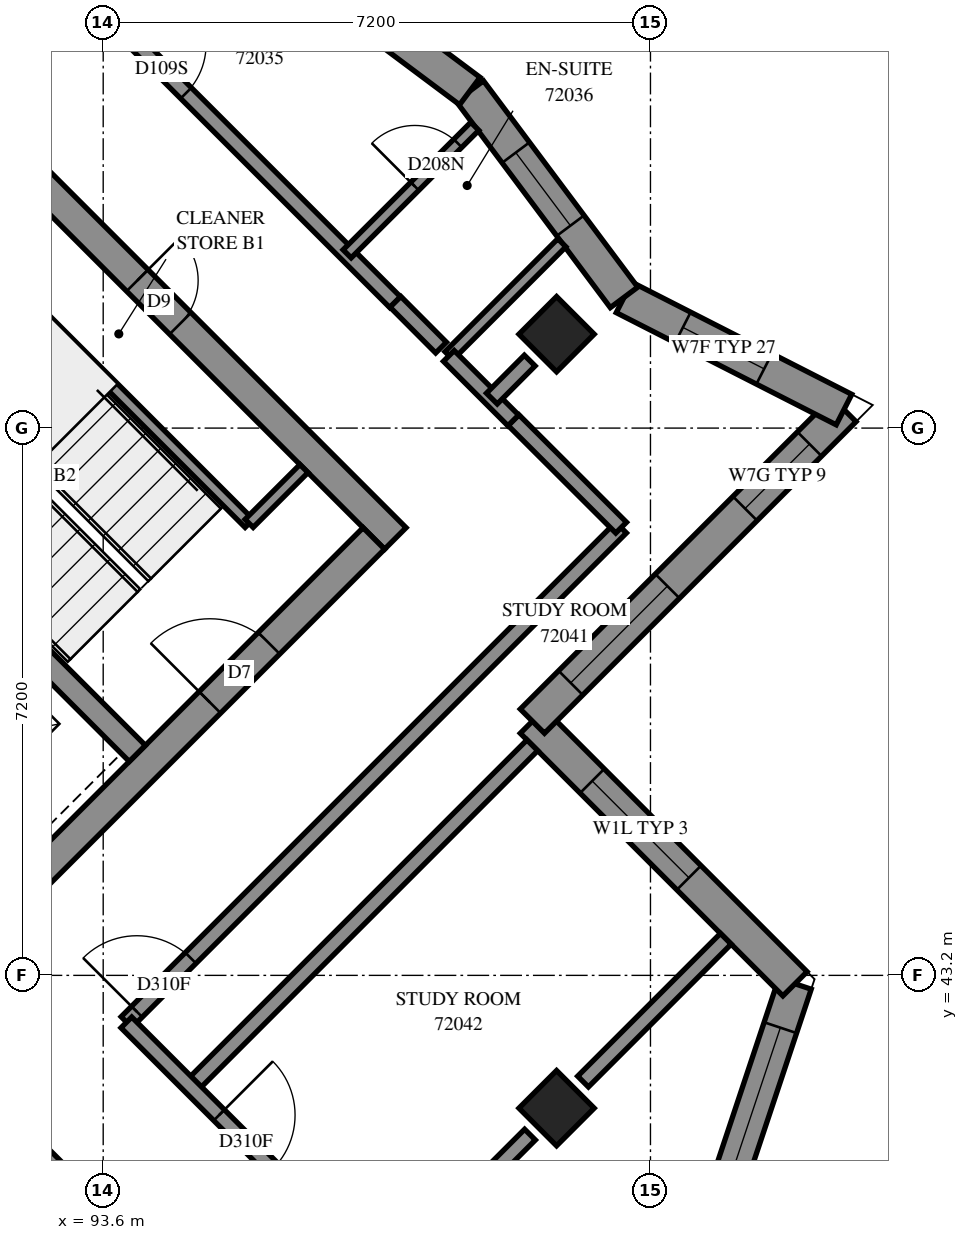
"""IFC4 building model, lengths in metres.
Left out: names, types, materials, properties, quantities, classifications, styles, units other than length and angle.
Written with IfcOpenShell. Run it as: python <this file> out.ifc"""

import sys

from ifc_helpers import new_model, si_unit, direction, frame, frame_2d, origin, origin_2d, place, context, subcontext, project, spatial, polyline, rectangle, outline, extrude, element, fill, save


model = new_model("IFC4")
c1 = context("Model", 3, precision=1e-05, world=origin(), true_north=direction((0.0, 1.0)))
c2 = subcontext(c1, "Body", "Model", "MODEL_VIEW")
j1 = project(units=[si_unit("LENGTHUNIT", "METRE"), si_unit("PLANEANGLEUNIT", "RADIAN")], contexts=[c1])
p1 = place(None, origin())
s1 = spatial("IfcSite", under=j1, at=p1, CompositionType="ELEMENT")
p2 = place(p1, origin())
s2 = spatial("IfcBuilding", under=s1, at=p2, CompositionType="ELEMENT")
p3 = place(p2, frame((0.0, 0.0, 264.2)))
s3 = spatial("IfcBuildingStorey", under=s2, at=p3, CompositionType="ELEMENT", Elevation=264.2)
for number, where, z_axis, x_axis in (
    (1, (99.565, 51.635, 0.0), (0.0, 0.0, 1.0), (0.707, -0.707, 0.0)),
    (2, (99.565, 41.453, 0.0), (0.0, 0.0, 1.0), (0.707, -0.707, 0.0)),
):
    element("IfcColumn", number, at=place(p3, frame(where, z_axis=z_axis, x_axis=x_axis)), inside=s3, PredefinedType="COLUMN", context=c2, shape_type="SweptSolid", body=[
        extrude(rectangle(XDim=0.7, YDim=0.7, at=origin_2d()), origin(), (0.0, 0.0, 1.0), 3.1),
    ])
p4 = place(p3, frame((86.695, 59.696, -0.3), z_axis=(0.0, 0.0, 1.0), x_axis=(0.7071100706, -0.7071034917, 0.0)))
e3 = element("IfcWall", 3, at=p4, inside=s3, PredefinedType="SHEAR", context=c2, shape_type="SweptSolid", body=[
    extrude(rectangle(XDim=15.2, YDim=0.4, at=frame_2d((7.6, 0.0))), origin(), (0.0, 0.0, 1.0), 2.7),
])
p5 = place(p4, frame((10.4, 0.0, 0.3)))
e4 = element("IfcOpeningElement", 4, at=p5, cuts=e3, PredefinedType="OPENING", context=c2, shape_type="SweptSolid", body=[
    extrude(rectangle(XDim=0.8, YDim=2.1, at=frame_2d((0.4, 1.05))), frame((0.0, 0.21, 0.0), z_axis=(0.0, -1.0, 0.0), x_axis=(1.0, 0.0, 0.0)), (0.0, 0.0, 1.0), 0.42),
])
p6 = place(p3, frame((86.978, 38.766, -0.3), z_axis=(0.0, 0.0, 1.0), x_axis=(0.7071067812, 0.7071067812, 0.0)))
e5 = element("IfcWall", 5, at=p6, inside=s3, PredefinedType="SHEAR", context=c2, shape_type="SweptSolid", body=[
    extrude(rectangle(XDim=14.4, YDim=0.4, at=frame_2d((7.2, 0.0))), origin(), (0.0, 0.0, 1.0), 2.7),
])
p7 = place(p6, frame((4.55, 0.0, 0.3)))
e6 = element("IfcOpeningElement", 6, at=p7, cuts=e5, PredefinedType="OPENING", context=c2, shape_type="SweptSolid", body=[
    extrude(rectangle(XDim=1.1, YDim=2.1, at=frame_2d((0.55, 1.05))), frame((0.0, 0.21, 0.0), z_axis=(0.0, -1.0, 0.0), x_axis=(1.0, 0.0, 0.0)), (0.0, 0.0, 1.0), 0.42),
])
p8 = place(p6, frame((11.35, 0.0, 0.3)))
e7 = element("IfcOpeningElement", 7, at=p8, cuts=e5, PredefinedType="OPENING", context=c2, shape_type="SweptSolid", body=[
    extrude(rectangle(XDim=1.1, YDim=2.1, at=frame_2d((0.55, 1.05))), frame((0.0, 0.21, 0.0), z_axis=(0.0, -1.0, 0.0), x_axis=(1.0, 0.0, 0.0)), (0.0, 0.0, 1.0), 0.42),
])
p9 = place(p3, frame((88.958, 51.211, 0.0), z_axis=(0.0, 0.0, 1.0), x_axis=(0.7070998367, -0.7071137256, 0.0)))
e8 = element("IfcWall", 8, at=p9, inside=s3, PredefinedType="SOLIDWALL", context=c2, shape_type="SweptSolid", body=[
    extrude(rectangle(XDim=7.2, YDim=0.3, at=frame_2d((3.6, 0.0))), origin(), (0.0, 0.0, 1.0), 3.1),
])
p10 = place(p3, frame((101.082, 38.232, 0.0), z_axis=(0.0, 0.0, 1.0), x_axis=(0.316227766, 0.9486832981, 0.0)))
e9 = element("IfcWall", 9, at=p10, inside=s3, PredefinedType="SOLIDWALL", context=c2, shape_type="SweptSolid", body=[
    extrude(outline(polyline([(-0.108, -0.225), (5.259, -0.225), (4.981, 0.225), (0.108, 0.225), (-0.108, -0.225)])), origin(), (0.0, 0.0, 1.0), 3.1),
])
p11 = place(p10, frame((1.711, 0.0, 0.45)))
e10 = element("IfcOpeningElement", 10, at=p11, cuts=e9, PredefinedType="OPENING", context=c2, shape_type="SweptSolid", body=[
    extrude(rectangle(XDim=2.8, YDim=2.55, at=frame_2d((1.4, 1.275))), frame((0.0, 0.235, 0.0), z_axis=(0.0, -1.0, 0.0), x_axis=(1.0, 0.0, 0.0)), (0.0, 0.0, 1.0), 0.47),
])
p12 = place(p3, frame((102.701, 43.089, 0.0), z_axis=(0.0, 0.0, 1.0), x_axis=(-0.7070965479, 0.7071170144, 0.0)))
e11 = element("IfcWall", 11, at=p12, inside=s3, PredefinedType="SOLIDWALL", context=c2, shape_type="SweptSolid", body=[
    extrude(outline(polyline([(-0.139, -0.225), (4.661, -0.225), (5.111, 0.225), (0.139, 0.225), (-0.139, -0.225)])), origin(), (0.0, 0.0, 1.0), 3.1),
])
p13 = place(p12, frame((1.974, 0.0, 0.6)))
e12 = element("IfcOpeningElement", 12, at=p13, cuts=e11, PredefinedType="OPENING", context=c2, shape_type="SweptSolid", body=[
    extrude(rectangle(XDim=1.8, YDim=1.9, at=frame_2d((0.9, 0.95))), frame((0.0, 0.235, 0.0), z_axis=(0.0, -1.0, 0.0), x_axis=(1.0, 0.0, 0.0)), (0.0, 0.0, 1.0), 0.47),
])
p14 = place(p3, frame((99.246, 46.544, 0.0), z_axis=(0.0, 0.0, 1.0), x_axis=(0.7071067812, 0.7071067812, 0.0)))
e13 = element("IfcWall", 13, at=p14, inside=s3, PredefinedType="SOLIDWALL", context=c2, shape_type="SweptSolid", body=[
    extrude(outline(polyline([(0.225, -0.225), (6.107, -0.225), (5.488, 0.225), (-0.225, 0.225), (0.225, -0.225)])), origin(), (0.0, 0.0, 1.0), 3.1),
])
p15 = place(p14, frame((0.713, 0.0, 0.6)))
e14 = element("IfcOpeningElement", 14, at=p15, cuts=e13, PredefinedType="OPENING", context=c2, shape_type="SweptSolid", body=[
    extrude(rectangle(XDim=1.8, YDim=1.9, at=frame_2d((0.9, 0.95))), frame((0.0, 0.235, 0.0), z_axis=(0.0, -1.0, 0.0), x_axis=(1.0, 0.0, 0.0)), (0.0, 0.0, 1.0), 0.47),
])
p16 = place(p14, frame((3.956, 0.0, 0.6)))
e15 = element("IfcOpeningElement", 15, at=p16, cuts=e13, PredefinedType="OPENING", context=c2, shape_type="SweptSolid", body=[
    extrude(rectangle(XDim=1.2, YDim=1.9, at=frame_2d((0.6, 0.95))), frame((0.0, 0.235, 0.0), z_axis=(0.0, -1.0, 0.0), x_axis=(1.0, 0.0, 0.0)), (0.0, 0.0, 1.0), 0.47),
])
p17 = place(p3, frame((103.346, 50.644, 0.0), z_axis=(0.0, 0.0, 1.0), x_axis=(-0.8908277316, 0.4543412292, 0.0)))
e16 = element("IfcWall", 16, at=p17, inside=s3, PredefinedType="SOLIDWALL", context=c2, shape_type="SweptSolid", body=[
    extrude(outline(polyline([(-0.31, -0.225), (3.196, -0.225), (3.301, 0.225), (0.31, 0.225), (-0.31, -0.225)])), origin(), (0.0, 0.0, 1.0), 3.1),
])
p18 = place(p17, frame((1.179, 0.0, 0.45)))
e17 = element("IfcOpeningElement", 17, at=p18, cuts=e16, PredefinedType="OPENING", context=c2, shape_type="SweptSolid", body=[
    extrude(rectangle(XDim=1.2, YDim=2.55, at=frame_2d((0.6, 1.275))), frame((0.0, 0.235, 0.0), z_axis=(0.0, -1.0, 0.0), x_axis=(1.0, 0.0, 0.0)), (0.0, 0.0, 1.0), 0.47),
])
p19 = place(p3, frame((100.452, 52.12, 0.0), z_axis=(0.0, 0.0, 1.0), x_axis=(-0.5986678127, 0.8009974095, 0.0)))
e18 = element("IfcWall", 18, at=p19, inside=s3, PredefinedType="SOLIDWALL", context=c2, shape_type="SweptSolid", body=[
    extrude(outline(polyline([(0.052, -0.225), (3.421, -0.225), (3.357, 0.225), (-0.052, 0.225), (0.052, -0.225)])), origin(), (0.0, 0.0, 1.0), 3.1),
])
p20 = place(p19, frame((1.178, 0.0, 0.45)))
e19 = element("IfcOpeningElement", 19, at=p20, cuts=e18, PredefinedType="OPENING", context=c2, shape_type="SweptSolid", body=[
    extrude(rectangle(XDim=1.2, YDim=2.55, at=frame_2d((0.6, 1.275))), frame((0.0, 0.235, 0.0), z_axis=(0.0, -1.0, 0.0), x_axis=(1.0, 0.0, 0.0)), (0.0, 0.0, 1.0), 0.47),
])
p21 = place(p3, frame((98.423, 54.834, 0.0), z_axis=(0.0, 0.0, 1.0), x_axis=(-0.8009997286, 0.5986647099, 0.0)))
e20 = element("IfcWall", 20, at=p21, inside=s3, PredefinedType="SOLIDWALL", context=c2, shape_type="SweptSolid", body=[
    extrude(outline(polyline([(-0.033, -0.225), (3.337, -0.225), (3.402, 0.225), (0.033, 0.225), (-0.033, -0.225)])), origin(), (0.0, 0.0, 1.0), 3.1),
])
p22 = place(p21, frame((1.253, 0.0, 0.45)))
e21 = element("IfcOpeningElement", 21, at=p22, cuts=e20, PredefinedType="OPENING", context=c2, shape_type="SweptSolid", body=[
    extrude(rectangle(XDim=1.2, YDim=2.55, at=frame_2d((0.6, 1.275))), frame((0.0, 0.235, 0.0), z_axis=(0.0, -1.0, 0.0), x_axis=(1.0, 0.0, 0.0)), (0.0, 0.0, 1.0), 0.47),
])
p23 = place(p3, frame((91.313, 53.354, 0.0), z_axis=(0.0, 0.0, 1.0), x_axis=(0.7071067812, -0.7071067812, 0.0)))
e22 = element("IfcWall", 22, at=p23, inside=s3, PredefinedType="PARTITIONING", context=c2, shape_type="SweptSolid", body=[
    extrude(rectangle(XDim=5.95, YDim=0.15, at=frame_2d((2.975, 0.0))), origin(), (0.0, 0.0, 1.0), 3.1),
])
p24 = place(p3, frame((95.52, 49.146, 0.0), z_axis=(0.0, 0.0, 1.0), x_axis=(0.7071067812, 0.7071067812, 0.0)))
e23 = element("IfcWall", 23, at=p24, inside=s3, PredefinedType="PARTITIONING", context=c2, shape_type="SweptSolid", body=[
    extrude(rectangle(XDim=1.02, YDim=0.15, at=frame_2d((0.51, 0.0))), origin(), (0.0, 0.0, 1.0), 3.1),
])
p25 = place(p3, frame((93.907, 42.585, 0.0), z_axis=(0.0, 0.0, 1.0), x_axis=(0.7071067812, 0.7071067812, 0.0)))
e24 = element("IfcWall", 24, at=p25, inside=s3, PredefinedType="PARTITIONING", context=c2, shape_type="SweptSolid", body=[
    extrude(rectangle(XDim=9.201, YDim=0.2, at=frame_2d((4.601, 0.0))), origin(), (0.0, 0.0, 1.0), 3.1),
])
p26 = place(p25, frame((0.193, 0.0, 0.0)))
e25 = element("IfcOpeningElement", 25, at=p26, cuts=e24, PredefinedType="OPENING", context=c2, shape_type="SweptSolid", body=[
    extrude(rectangle(XDim=1.0, YDim=2.1, at=frame_2d((0.5, 1.05))), frame((0.0, 0.11, 0.0), z_axis=(0.0, -1.0, 0.0), x_axis=(1.0, 0.0, 0.0)), (0.0, 0.0, 1.0), 0.22),
])
p27 = place(p3, frame((94.755, 41.737, 0.0), z_axis=(0.0, 0.0, 1.0), x_axis=(0.7071146549, 0.7070989073, 0.0)))
e26 = element("IfcWall", 26, at=p27, inside=s3, PredefinedType="PARTITIONING", context=c2, shape_type="SweptSolid", body=[
    extrude(rectangle(XDim=6.35, YDim=0.2, at=frame_2d((3.175, 0.0))), origin(), (0.0, 0.0, 1.0), 3.1),
])
p28 = place(p3, frame((93.621, 55.875, 0.0), z_axis=(0.0, 0.0, 1.0), x_axis=(0.7071623255, -0.7070512325, 0.0)))
e27 = element("IfcWall", 27, at=p28, inside=s3, PredefinedType="PARTITIONING", context=c2, shape_type="SweptSolid", body=[
    extrude(rectangle(XDim=5.401, YDim=0.2, at=frame_2d((2.7, 0.0))), origin(), (0.0, 0.0, 1.0), 3.1),
])
p29 = place(p28, frame((0.611, 0.0, 0.0)))
e28 = element("IfcOpeningElement", 28, at=p29, cuts=e27, PredefinedType="OPENING", context=c2, shape_type="SweptSolid", body=[
    extrude(rectangle(XDim=0.9, YDim=2.1, at=frame_2d((0.45, 1.05))), frame((0.0, 0.11, 0.0), z_axis=(0.0, -1.0, 0.0), x_axis=(1.0, 0.0, 0.0)), (0.0, 0.0, 1.0), 0.22),
])
p30 = place(p3, frame((93.905, 42.581, 0.0), z_axis=(0.0, 0.0, 1.0), x_axis=(0.7071067812, -0.7071067812, 0.0)))
e29 = element("IfcWall", 29, at=p30, inside=s3, PredefinedType="PARTITIONING", context=c2, shape_type="SweptSolid", body=[
    extrude(rectangle(XDim=4.8, YDim=0.2, at=frame_2d((2.4, 0.0))), origin(), (0.0, 0.0, 1.0), 3.1),
])
p31 = place(p30, frame((1.725, 0.0, 0.0)))
e30 = element("IfcOpeningElement", 30, at=p31, cuts=e29, PredefinedType="OPENING", context=c2, shape_type="SweptSolid", body=[
    extrude(rectangle(XDim=1.0, YDim=2.1, at=frame_2d((0.5, 1.05))), frame((0.0, 0.11, 0.0), z_axis=(0.0, -1.0, 0.0), x_axis=(1.0, 0.0, 0.0)), (0.0, 0.0, 1.0), 0.22),
])
p32 = place(p3, frame((92.491, 41.167, 0.0), z_axis=(0.0, 0.0, 1.0), x_axis=(0.7071067812, -0.7071067812, 0.0)))
e31 = element("IfcWall", 31, at=p32, inside=s3, PredefinedType="PARTITIONING", context=c2, shape_type="SweptSolid", body=[
    extrude(rectangle(XDim=4.8, YDim=0.2, at=frame_2d((2.4, 0.0))), origin(), (0.0, 0.0, 1.0), 3.1),
])
p33 = place(p32, frame((1.725, 0.0, 0.0)))
e32 = element("IfcOpeningElement", 32, at=p33, cuts=e31, PredefinedType="OPENING", context=c2, shape_type="SweptSolid", body=[
    extrude(rectangle(XDim=1.0, YDim=2.1, at=frame_2d((0.5, 1.05))), frame((0.0, 0.11, 0.0), z_axis=(0.0, -1.0, 0.0), x_axis=(1.0, 0.0, 0.0)), (0.0, 0.0, 1.0), 0.22),
])
p34 = place(p3, frame((97.301, 39.191, 0.0), z_axis=(0.0, 0.0, 1.0), x_axis=(0.7071067812, 0.7071067812, 0.0)))
e33 = element("IfcWall", 33, at=p34, inside=s3, PredefinedType="PARTITIONING", context=c2, shape_type="SweptSolid", body=[
    extrude(rectangle(XDim=2.707, YDim=0.2, at=frame_2d((1.353, 0.0))), origin(), (0.0, 0.0, 1.0), 2.6),
])
p35 = place(p3, frame((99.913, 41.803, 0.0), z_axis=(0.0, 0.0, 1.0), x_axis=(0.7071067812, 0.7071067812, 0.0)))
e34 = element("IfcWall", 34, at=p35, inside=s3, PredefinedType="PARTITIONING", context=c2, shape_type="SweptSolid", body=[
    extrude(rectangle(XDim=2.656, YDim=0.2, at=frame_2d((1.328, 0.0))), origin(), (0.0, 0.0, 1.0), 3.1),
])
p36 = place(p3, frame((96.809, 52.693, 0.0), z_axis=(0.0, 0.0, 1.0), x_axis=(0.7075279036, 0.7066854079, 0.0)))
e35 = element("IfcWall", 35, at=p36, inside=s3, PredefinedType="PARTITIONING", context=c2, shape_type="SweptSolid", body=[
    extrude(rectangle(XDim=2.374, YDim=0.15, at=frame_2d((1.187, 0.0))), origin(), (0.0, 0.0, 1.0), 3.1),
])
p37 = place(p36, frame((1.258, 0.0, 0.0)))
e36 = element("IfcOpeningElement", 36, at=p37, cuts=e35, PredefinedType="OPENING", context=c2, shape_type="SweptSolid", body=[
    extrude(rectangle(XDim=0.8, YDim=2.1, at=frame_2d((0.4, 1.05))), frame((0.0, 0.085, 0.0), z_axis=(0.0, -1.0, 0.0), x_axis=(1.0, 0.0, 0.0)), (0.0, 0.0, 1.0), 0.17),
])
p38 = place(p3, frame((98.149, 51.353, 0.0), z_axis=(0.0, 0.0, 1.0), x_axis=(0.7070829733, 0.7071305883, 0.0)))
e37 = element("IfcWall", 37, at=p38, inside=s3, PredefinedType="PARTITIONING", context=c2, shape_type="SweptSolid", body=[
    extrude(rectangle(XDim=2.1, YDim=0.15, at=frame_2d((1.05, 0.0))), origin(), (0.0, 0.0, 1.0), 3.1),
])
p39 = place(p3, frame((98.998, 50.504, 0.0), z_axis=(0.0, 0.0, 1.0), x_axis=(0.7076063266, -0.7066068826, 0.0)))
e38 = element("IfcWall", 38, at=p39, inside=s3, PredefinedType="PARTITIONING", context=c2, shape_type="SweptSolid", body=[
    extrude(rectangle(XDim=2.001, YDim=0.2, at=frame_2d((1.001, 0.0))), origin(), (0.0, 0.0, 1.0), 3.1),
])
p40 = place(p3, frame((98.147, 51.349, 0.0), z_axis=(0.0, 0.0, 1.0), x_axis=(0.7071067812, -0.7071067812, 0.0)))
e39 = element("IfcWall", 39, at=p40, inside=s3, PredefinedType="PARTITIONING", context=c2, shape_type="SweptSolid", body=[
    extrude(rectangle(XDim=1.199, YDim=0.2, at=frame_2d((0.6, 0.0))), origin(), (0.0, 0.0, 1.0), 3.1),
])
p41 = place(p3, frame((97.445, 52.061, 0.0), z_axis=(0.0, 0.0, 1.0), x_axis=(0.7059292536, -0.7082823511, 0.0)))
e40 = element("IfcWall", 40, at=p41, inside=s3, PredefinedType="PARTITIONING", context=c2, shape_type="SweptSolid", body=[
    extrude(rectangle(XDim=0.85, YDim=0.2, at=frame_2d((0.425, 0.0))), origin(), (0.0, 0.0, 1.0), 3.1),
])
p42 = place(p3, frame((98.714, 50.788, 0.0), z_axis=(0.0, 0.0, 1.0), x_axis=(0.7056883165, 0.7085224061, 0.0)))
e41 = element("IfcWall", 41, at=p42, inside=s3, PredefinedType="PARTITIONING", context=c2, shape_type="SweptSolid", body=[
    extrude(rectangle(XDim=0.706, YDim=0.2, at=frame_2d((0.353, 0.0))), origin(), (0.0, 0.0, 1.0), 3.1),
])
p43 = place(p11, origin())
e42 = element("IfcWindow", 42, at=p43, inside=s3, PartitioningType="SINGLE_PANEL", PredefinedType="WINDOW", context=c2, shape_type="SweptSolid", body=[
    extrude(rectangle(XDim=2.8, YDim=2.55, at=frame_2d((1.4, 1.275))), frame((0.0, 0.205, 0.0), z_axis=(0.0, -1.0, 0.0), x_axis=(1.0, 0.0, 0.0)), (0.0, 0.0, 1.0), 0.06),
])
fill(e10, e42)
p44 = place(p13, origin())
e43 = element("IfcWindow", 43, at=p44, inside=s3, PartitioningType="SINGLE_PANEL", PredefinedType="WINDOW", context=c2, shape_type="SweptSolid", body=[
    extrude(rectangle(XDim=1.8, YDim=1.9, at=frame_2d((0.9, 0.95))), frame((0.0, 0.205, 0.0), z_axis=(0.0, -1.0, 0.0), x_axis=(1.0, 0.0, 0.0)), (0.0, 0.0, 1.0), 0.06),
])
fill(e12, e43)
p45 = place(p15, origin())
e44 = element("IfcWindow", 44, at=p45, inside=s3, PartitioningType="SINGLE_PANEL", PredefinedType="WINDOW", context=c2, shape_type="SweptSolid", body=[
    extrude(rectangle(XDim=1.8, YDim=1.9, at=frame_2d((0.9, 0.95))), frame((0.0, 0.205, 0.0), z_axis=(0.0, -1.0, 0.0), x_axis=(1.0, 0.0, 0.0)), (0.0, 0.0, 1.0), 0.06),
])
fill(e14, e44)
p46 = place(p16, origin())
e45 = element("IfcWindow", 45, at=p46, inside=s3, PartitioningType="SINGLE_PANEL", PredefinedType="WINDOW", context=c2, shape_type="SweptSolid", body=[
    extrude(rectangle(XDim=1.2, YDim=1.9, at=frame_2d((0.6, 0.95))), frame((0.0, 0.205, 0.0), z_axis=(0.0, -1.0, 0.0), x_axis=(1.0, 0.0, 0.0)), (0.0, 0.0, 1.0), 0.06),
])
fill(e15, e45)
p47 = place(p18, origin())
e46 = element("IfcWindow", 46, at=p47, inside=s3, PartitioningType="SINGLE_PANEL", PredefinedType="WINDOW", context=c2, shape_type="SweptSolid", body=[
    extrude(rectangle(XDim=1.2, YDim=2.55, at=frame_2d((0.6, 1.275))), frame((0.0, 0.205, 0.0), z_axis=(0.0, -1.0, 0.0), x_axis=(1.0, 0.0, 0.0)), (0.0, 0.0, 1.0), 0.06),
])
fill(e17, e46)
p48 = place(p20, origin())
e47 = element("IfcWindow", 47, at=p48, inside=s3, PartitioningType="SINGLE_PANEL", PredefinedType="WINDOW", context=c2, shape_type="SweptSolid", body=[
    extrude(rectangle(XDim=1.2, YDim=2.55, at=frame_2d((0.6, 1.275))), frame((0.0, 0.205, 0.0), z_axis=(0.0, -1.0, 0.0), x_axis=(1.0, 0.0, 0.0)), (0.0, 0.0, 1.0), 0.06),
])
fill(e19, e47)
p49 = place(p5, origin())
e48 = element("IfcDoor", 48, at=p49, inside=s3, OperationType="SINGLE_SWING_RIGHT", PredefinedType="DOOR", context=c2, shape_type="SweptSolid", body=[
    extrude(rectangle(XDim=0.8, YDim=2.1, at=frame_2d((0.4, 1.05))), frame((0.0, 0.025, 0.0), z_axis=(0.0, -1.0, 0.0), x_axis=(1.0, 0.0, 0.0)), (0.0, 0.0, 1.0), 0.05),
])
fill(e4, e48)
p50 = place(p8, origin())
e49 = element("IfcDoor", 49, at=p50, inside=s3, OperationType="SINGLE_SWING_RIGHT", PredefinedType="DOOR", context=c2, shape_type="SweptSolid", body=[
    extrude(rectangle(XDim=1.1, YDim=2.1, at=frame_2d((0.55, 1.05))), frame((0.0, 0.025, 0.0), z_axis=(0.0, -1.0, 0.0), x_axis=(1.0, 0.0, 0.0)), (0.0, 0.0, 1.0), 0.05),
])
fill(e7, e49)
p51 = place(p29, origin())
e50 = element("IfcDoor", 50, at=p51, inside=s3, OperationType="SINGLE_SWING_LEFT", PredefinedType="DOOR", context=c2, shape_type="SweptSolid", body=[
    extrude(rectangle(XDim=0.9, YDim=2.1, at=frame_2d((0.45, 1.05))), frame((0.0, 0.025, 0.0), z_axis=(0.0, -1.0, 0.0), x_axis=(1.0, 0.0, 0.0)), (0.0, 0.0, 1.0), 0.05),
])
fill(e28, e50)
p52 = place(p37, origin())
e51 = element("IfcDoor", 51, at=p52, inside=s3, OperationType="SINGLE_SWING_RIGHT", PredefinedType="DOOR", context=c2, shape_type="SweptSolid", body=[
    extrude(rectangle(XDim=0.8, YDim=2.1, at=frame_2d((0.4, 1.05))), frame((0.0, 0.025, 0.0), z_axis=(0.0, -1.0, 0.0), x_axis=(1.0, 0.0, 0.0)), (0.0, 0.0, 1.0), 0.05),
])
fill(e36, e51)
p53 = place(p26, origin())
e52 = element("IfcDoor", 52, at=p53, inside=s3, OperationType="SINGLE_SWING_LEFT", PredefinedType="DOOR", context=c2, shape_type="SweptSolid", body=[
    extrude(rectangle(XDim=1.0, YDim=2.1, at=frame_2d((0.5, 1.05))), frame((0.0, 0.025, 0.0), z_axis=(0.0, -1.0, 0.0), x_axis=(1.0, 0.0, 0.0)), (0.0, 0.0, 1.0), 0.05),
])
fill(e25, e52)
p54 = place(p31, origin())
e53 = element("IfcDoor", 53, at=p54, inside=s3, OperationType="SINGLE_SWING_RIGHT", PredefinedType="DOOR", context=c2, shape_type="SweptSolid", body=[
    extrude(rectangle(XDim=1.0, YDim=2.1, at=frame_2d((0.5, 1.05))), frame((0.0, 0.025, 0.0), z_axis=(0.0, -1.0, 0.0), x_axis=(1.0, 0.0, 0.0)), (0.0, 0.0, 1.0), 0.05),
])
fill(e30, e53)
save(model, sys.argv[1])
